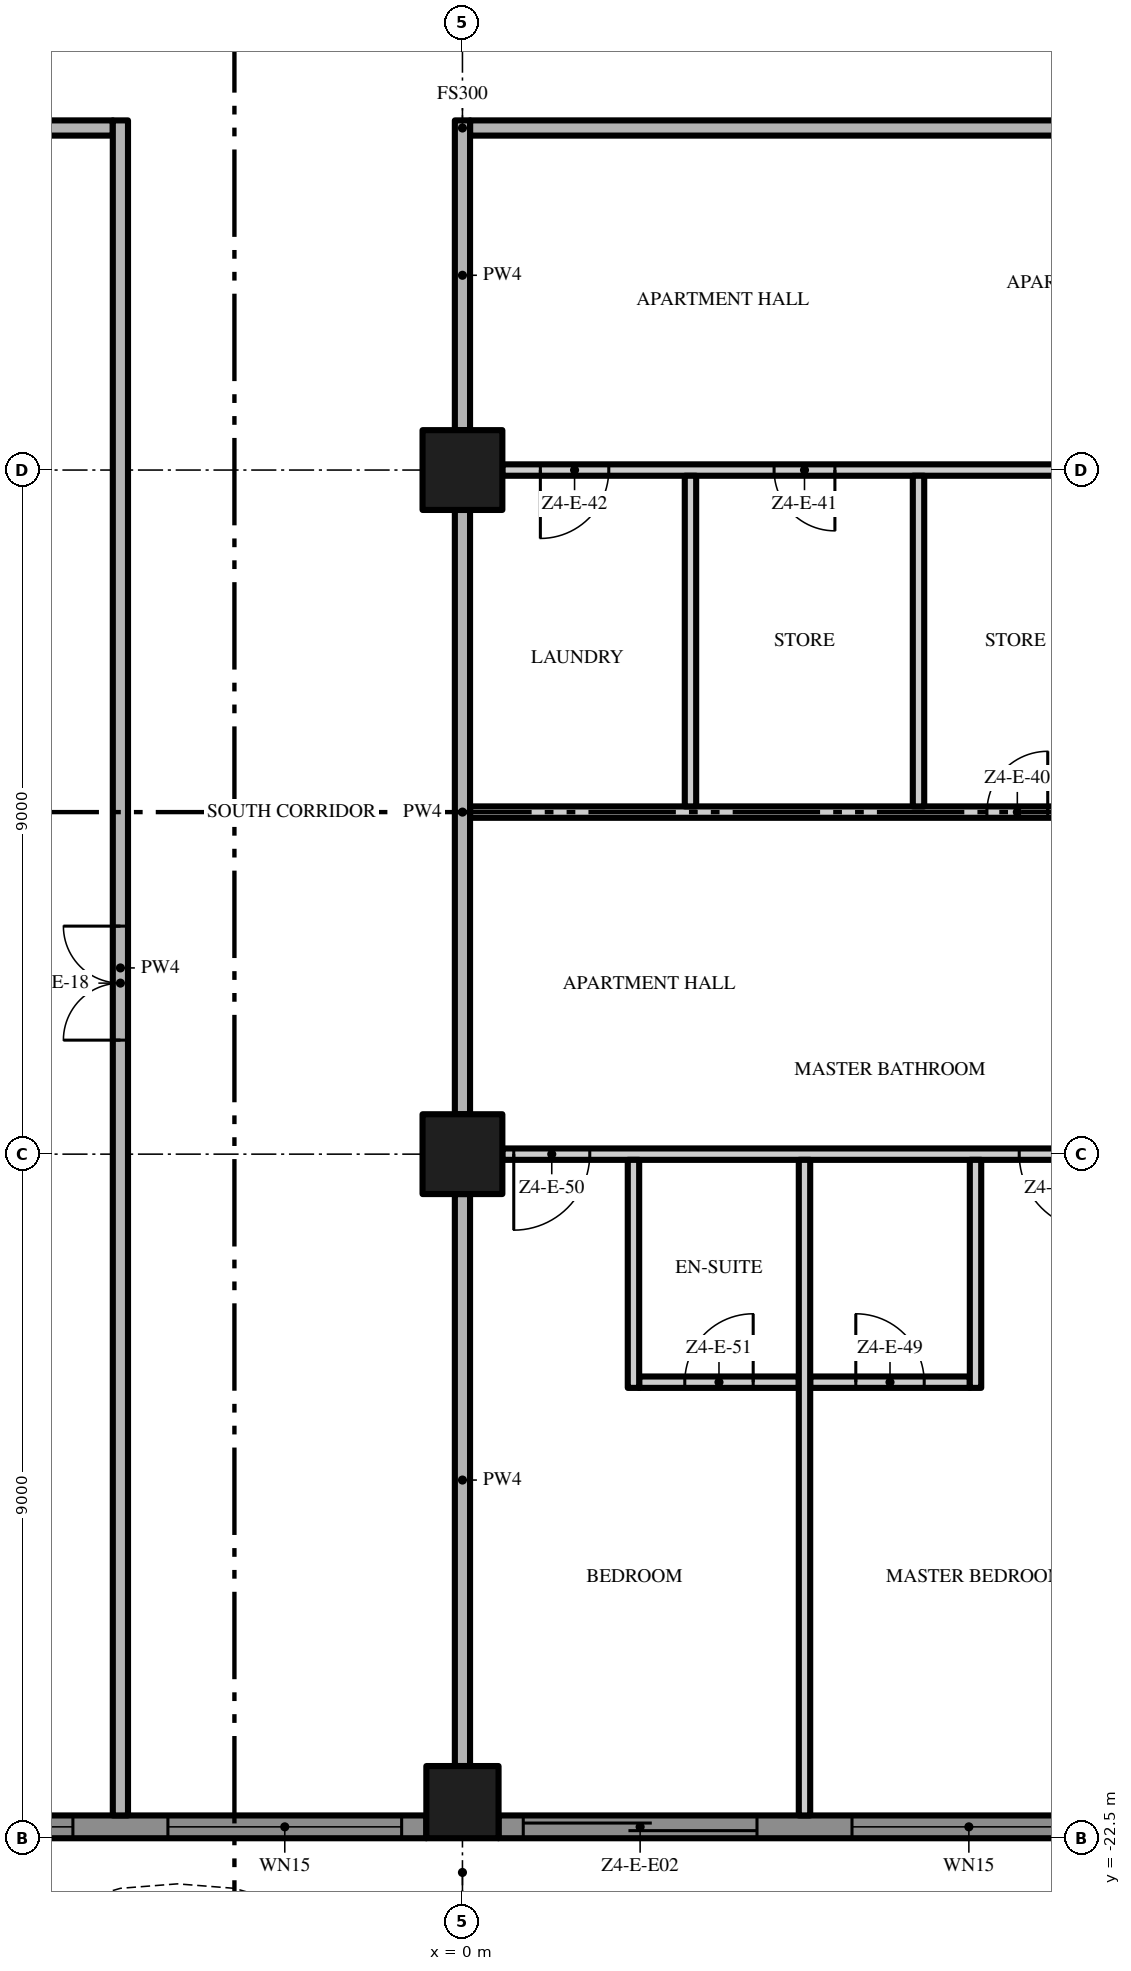
"""IFC4 building model, lengths in metres.
Left out: names, types, materials, properties, quantities, classifications, styles, units other than length and angle.
Written with IfcOpenShell. Run it as: python <this file> out.ifc"""

import sys

from ifc_helpers import new_model, si_unit, direction, frame, frame_2d, origin, origin_2d, place, context, subcontext, project, spatial, polyline, rectangle, outline, extrude, element, fill, save


model = new_model("IFC4")
c1 = context("Model", 3, precision=1e-05, world=origin(), true_north=direction((0.0, 1.0)))
c2 = subcontext(c1, "Body", "Model", "MODEL_VIEW")
j1 = project(units=[si_unit("LENGTHUNIT", "METRE"), si_unit("PLANEANGLEUNIT", "RADIAN")], contexts=[c1])
p1 = place(None, origin())
s1 = spatial("IfcSite", under=j1, at=p1, CompositionType="ELEMENT")
p2 = place(p1, origin())
s2 = spatial("IfcBuilding", under=s1, at=p2, CompositionType="ELEMENT")
p3 = place(p2, frame((0.0, 0.0, 226.2)))
s3 = spatial("IfcBuildingStorey", under=s2, at=p3, CompositionType="ELEMENT", Elevation=226.2)
p4 = place(p3, frame((0.0, -13.5, 0.0), z_axis=(0.0, 0.0, 1.0), x_axis=(1.0, 0.0, 0.0)))
e1 = element("IfcColumn", 1, at=p4, inside=s3, PredefinedType="COLUMN", context=c2, shape_type="SweptSolid", body=[
    extrude(rectangle(XDim=1.05, YDim=1.05, at=origin_2d()), origin(), (0.0, 0.0, 1.0), 3.5),
])
p5 = place(p3, frame((0.0, -22.025, 0.0), z_axis=(0.0, 0.0, 1.0), x_axis=(1.0, 0.0, 0.0)))
e2 = element("IfcColumn", 2, at=p5, inside=s3, PredefinedType="COLUMN", context=c2, shape_type="SweptSolid", body=[
    extrude(rectangle(XDim=0.95, YDim=0.95, at=origin_2d()), origin(), (0.0, 0.0, 1.0), 3.5),
])
p6 = place(p3, frame((0.0, -4.5, 0.0), z_axis=(0.0, 0.0, 1.0), x_axis=(1.0, 0.0, 0.0)))
e3 = element("IfcColumn", 3, at=p6, inside=s3, PredefinedType="COLUMN", context=c2, shape_type="SweptSolid", body=[
    extrude(rectangle(XDim=1.05, YDim=1.05, at=origin_2d()), origin(), (0.0, 0.0, 1.0), 3.5),
])
p7 = place(p3, frame((-0.475, -22.35, 0.0), z_axis=(0.0, 0.0, 1.0), x_axis=(-1.0, 0.0, 0.0)))
e4 = element("IfcWall", 4, at=p7, inside=s3, PredefinedType="SOLIDWALL", context=c2, shape_type="SweptSolid", body=[
    extrude(rectangle(XDim=8.05, YDim=0.3, at=frame_2d((4.025, 0.0))), origin(), (0.0, 0.0, 1.0), 3.5),
])
p8 = place(p7, frame((4.65, 0.0, 0.45)))
e5 = element("IfcOpeningElement", 5, at=p8, cuts=e4, PredefinedType="OPENING", context=c2, shape_type="SweptSolid", body=[
    extrude(rectangle(XDim=3.075, YDim=2.65, at=frame_2d((1.538, 1.325))), frame((0.0, 0.16, 0.0), z_axis=(0.0, -1.0, 0.0), x_axis=(1.0, 0.0, 0.0)), (0.0, 0.0, 1.0), 0.32),
])
p9 = place(p7, frame((0.325, 0.0, 0.45)))
e6 = element("IfcOpeningElement", 6, at=p9, cuts=e4, PredefinedType="OPENING", context=c2, shape_type="SweptSolid", body=[
    extrude(rectangle(XDim=3.075, YDim=2.65, at=frame_2d((1.538, 1.325))), frame((0.0, 0.16, 0.0), z_axis=(0.0, -1.0, 0.0), x_axis=(1.0, 0.0, 0.0)), (0.0, 0.0, 1.0), 0.32),
])
p10 = place(p3, frame((8.525, -22.35, 0.0), z_axis=(0.0, 0.0, 1.0), x_axis=(-1.0, 0.0, 0.0)))
e7 = element("IfcWall", 7, at=p10, inside=s3, PredefinedType="SOLIDWALL", context=c2, shape_type="SweptSolid", body=[
    extrude(rectangle(XDim=8.05, YDim=0.3, at=frame_2d((4.025, 0.0))), origin(), (0.0, 0.0, 1.0), 3.5),
])
p11 = place(p10, frame((4.65, 0.0, 0.0)))
e8 = element("IfcOpeningElement", 8, at=p11, cuts=e7, PredefinedType="OPENING", context=c2, shape_type="SweptSolid", body=[
    extrude(rectangle(XDim=3.075, YDim=2.4, at=frame_2d((1.538, 1.2))), frame((0.0, 0.16, 0.0), z_axis=(0.0, -1.0, 0.0), x_axis=(1.0, 0.0, 0.0)), (0.0, 0.0, 1.0), 0.32),
])
p12 = place(p10, frame((0.325, 0.0, 0.45)))
e9 = element("IfcOpeningElement", 9, at=p12, cuts=e7, PredefinedType="OPENING", context=c2, shape_type="SweptSolid", body=[
    extrude(rectangle(XDim=3.075, YDim=2.65, at=frame_2d((1.538, 1.325))), frame((0.0, 0.16, 0.0), z_axis=(0.0, -1.0, 0.0), x_axis=(1.0, 0.0, 0.0)), (0.0, 0.0, 1.0), 0.32),
])
p13 = place(p3, origin())
e10 = element("IfcWall", 10, at=p13, inside=s3, PredefinedType="USERDEFINED", context=c2, shape_type="SweptSolid", body=[
    extrude(outline(polyline([(-22.5, -24.3), (-21.0, -23.595), (-19.5, -23.159), (-18.75, -23.1), (-18.0, -23.159), (-16.5, -23.595), (-15.0, -24.3), (-13.5, -25.005), (-12.0, -25.441), (-11.25, -25.5), (-10.5, -25.441), (-9.0, -25.005), (-7.5, -24.3), (-6.0, -23.595), (-4.5, -23.159), (-3.75, -23.1), (-3.0, -23.159), (-1.5, -23.595), (0.0, -24.3), (1.5, -25.005), (3.0, -25.441), (3.75, -25.5), (4.5, -25.441), (6.0, -25.005), (7.5, -24.3), (9.0, -23.595), (10.5, -23.159), (11.25, -23.1), (12.0, -23.159), (13.5, -23.595), (15.0, -24.3), (16.5, -25.005), (18.0, -25.441), (18.75, -25.5), (19.5, -25.441), (21.0, -25.005), (22.5, -24.3), (22.394, -24.074), (20.911, -24.771), (19.455, -25.194), (18.75, -25.249), (18.045, -25.194), (16.589, -24.771), (15.106, -24.074), (13.589, -23.36), (12.045, -22.911), (11.25, -22.849), (10.455, -22.911), (8.911, -23.36), (7.394, -24.074), (5.911, -24.771), (4.455, -25.194), (3.75, -25.249), (3.045, -25.194), (1.589, -24.771), (0.106, -24.074), (-1.411, -23.36), (-2.955, -22.911), (-3.75, -22.849), (-4.545, -22.911), (-6.089, -23.36), (-7.606, -24.074), (-9.089, -24.771), (-10.545, -25.194), (-11.25, -25.249), (-11.955, -25.194), (-13.411, -24.771), (-14.894, -24.074), (-16.411, -23.36), (-17.955, -22.911), (-18.75, -22.849), (-19.545, -22.911), (-21.089, -23.36), (-22.606, -24.074), (-22.5, -24.3)])), origin(), (0.0, 0.0, 1.0), 0.9),
])
p14 = place(p3, frame((2.325, -16.5, 0.0), z_axis=(0.0, 0.0, 1.0), x_axis=(1.0, 0.0, 0.0)))
e11 = element("IfcWall", 11, at=p14, inside=s3, PredefinedType="PARTITIONING", context=c2, shape_type="SweptSolid", body=[
    extrude(rectangle(XDim=2.1, YDim=0.15, at=frame_2d((1.05, 0.0))), origin(), (0.0, 0.0, 1.0), 3.5),
])
p15 = place(p14, frame((0.6, 0.0, 0.0)))
e12 = element("IfcOpeningElement", 12, at=p15, cuts=e11, PredefinedType="OPENING", context=c2, shape_type="SweptSolid", body=[
    extrude(rectangle(XDim=0.9, YDim=2.1, at=frame_2d((0.45, 1.05))), frame((0.0, 0.085, 0.0), z_axis=(0.0, -1.0, 0.0), x_axis=(1.0, 0.0, 0.0)), (0.0, 0.0, 1.0), 0.17),
])
p16 = place(p3, frame((4.575, -16.5, 0.0), z_axis=(0.0, 0.0, 1.0), x_axis=(1.0, 0.0, 0.0)))
e13 = element("IfcWall", 13, at=p16, inside=s3, PredefinedType="PARTITIONING", context=c2, shape_type="SweptSolid", body=[
    extrude(rectangle(XDim=2.1, YDim=0.15, at=frame_2d((1.05, 0.0))), origin(), (0.0, 0.0, 1.0), 3.5),
])
p17 = place(p16, frame((0.6, 0.0, 0.0)))
e14 = element("IfcOpeningElement", 14, at=p17, cuts=e13, PredefinedType="OPENING", context=c2, shape_type="SweptSolid", body=[
    extrude(rectangle(XDim=0.9, YDim=2.1, at=frame_2d((0.45, 1.05))), frame((0.0, 0.085, 0.0), z_axis=(0.0, -1.0, 0.0), x_axis=(1.0, 0.0, 0.0)), (0.0, 0.0, 1.0), 0.17),
])
p18 = place(p3, frame((8.475, -13.5, 0.0), z_axis=(0.0, 0.0, 1.0), x_axis=(-1.0, 0.0, 0.0)))
e15 = element("IfcWall", 15, at=p18, inside=s3, PredefinedType="PARTITIONING", context=c2, shape_type="SweptSolid", body=[
    extrude(rectangle(XDim=7.95, YDim=0.15, at=frame_2d((3.975, 0.0))), origin(), (0.0, 0.0, 1.0), 3.5),
])
p19 = place(p18, frame((0.15, 0.0, 0.0)))
e16 = element("IfcOpeningElement", 16, at=p19, cuts=e15, PredefinedType="OPENING", context=c2, shape_type="SweptSolid", body=[
    extrude(rectangle(XDim=1.0, YDim=2.4, at=frame_2d((0.5, 1.2))), frame((0.0, 0.085, 0.0), z_axis=(0.0, -1.0, 0.0), x_axis=(1.0, 0.0, 0.0)), (0.0, 0.0, 1.0), 0.17),
])
p20 = place(p18, frame((6.8, 0.0, 0.0)))
e17 = element("IfcOpeningElement", 17, at=p20, cuts=e15, PredefinedType="OPENING", context=c2, shape_type="SweptSolid", body=[
    extrude(rectangle(XDim=1.0, YDim=2.4, at=frame_2d((0.5, 1.2))), frame((0.0, 0.085, 0.0), z_axis=(0.0, -1.0, 0.0), x_axis=(1.0, 0.0, 0.0)), (0.0, 0.0, 1.0), 0.17),
])
p21 = place(p3, frame((0.1, -9.0, 0.0), z_axis=(0.0, 0.0, 1.0), x_axis=(1.0, 0.0, 0.0)))
e18 = element("IfcWall", 18, at=p21, inside=s3, PredefinedType="PARTITIONING", context=c2, shape_type="SweptSolid", body=[
    extrude(rectangle(XDim=11.075, YDim=0.15, at=frame_2d((5.537, 0.0))), origin(), (0.0, 0.0, 1.0), 3.5),
])
p22 = place(p21, frame((6.8, 0.0, 0.0)))
e19 = element("IfcOpeningElement", 19, at=p22, cuts=e18, PredefinedType="OPENING", context=c2, shape_type="SweptSolid", body=[
    extrude(rectangle(XDim=0.8, YDim=2.0, at=frame_2d((0.4, 1.0))), frame((0.0, 0.085, 0.0), z_axis=(0.0, -1.0, 0.0), x_axis=(1.0, 0.0, 0.0)), (0.0, 0.0, 1.0), 0.17),
])
p23 = place(p3, frame((8.475, -4.5, 0.0), z_axis=(0.0, 0.0, 1.0), x_axis=(-1.0, 0.0, 0.0)))
e20 = element("IfcWall", 20, at=p23, inside=s3, PredefinedType="PARTITIONING", context=c2, shape_type="SweptSolid", body=[
    extrude(rectangle(XDim=7.95, YDim=0.15, at=frame_2d((3.975, 0.0))), origin(), (0.0, 0.0, 1.0), 3.5),
])
p24 = place(p23, frame((3.575, 0.0, 0.0)))
e21 = element("IfcOpeningElement", 21, at=p24, cuts=e20, PredefinedType="OPENING", context=c2, shape_type="SweptSolid", body=[
    extrude(rectangle(XDim=0.8, YDim=2.0, at=frame_2d((0.4, 1.0))), frame((0.0, 0.085, 0.0), z_axis=(0.0, -1.0, 0.0), x_axis=(1.0, 0.0, 0.0)), (0.0, 0.0, 1.0), 0.17),
])
p25 = place(p23, frame((6.55, 0.0, 0.0)))
e22 = element("IfcOpeningElement", 22, at=p25, cuts=e20, PredefinedType="OPENING", context=c2, shape_type="SweptSolid", body=[
    extrude(rectangle(XDim=0.9, YDim=2.1, at=frame_2d((0.45, 1.05))), frame((0.0, 0.085, 0.0), z_axis=(0.0, -1.0, 0.0), x_axis=(1.0, 0.0, 0.0)), (0.0, 0.0, 1.0), 0.17),
])
p26 = place(p3, frame((-17.4, 0.0, 0.0), z_axis=(0.0, 0.0, 1.0), x_axis=(1.0, 0.0, 0.0)))
e23 = element("IfcWall", 23, at=p26, inside=s3, PredefinedType="PARTITIONING", context=c2, shape_type="SweptSolid", body=[
    extrude(rectangle(XDim=12.8, YDim=0.2, at=frame_2d((6.4, 0.0))), origin(), (0.0, 0.0, 1.0), 3.5),
])
p27 = place(p3, frame((17.4, 0.0, 0.0), z_axis=(0.0, 0.0, 1.0), x_axis=(-1.0, 0.0, 0.0)))
e24 = element("IfcWall", 24, at=p27, inside=s3, PredefinedType="PARTITIONING", context=c2, shape_type="SweptSolid", body=[
    extrude(rectangle(XDim=17.3, YDim=0.2, at=frame_2d((8.65, 0.0))), origin(), (0.0, 0.0, 1.0), 3.5),
])
p28 = place(p27, frame((7.65, 0.0, 0.0)))
e25 = element("IfcOpeningElement", 25, at=p28, cuts=e24, PredefinedType="OPENING", context=c2, shape_type="SweptSolid", body=[
    extrude(rectangle(XDim=1.5, YDim=2.4, at=frame_2d((0.75, 1.2))), frame((0.0, 0.11, 0.0), z_axis=(0.0, -1.0, 0.0), x_axis=(1.0, 0.0, 0.0)), (0.0, 0.0, 1.0), 0.22),
])
p29 = place(p3, frame((-4.5, -22.2, 0.0), z_axis=(0.0, 0.0, 1.0), x_axis=(0.0, 1.0, 0.0)))
e26 = element("IfcWall", 26, at=p29, inside=s3, PredefinedType="PARTITIONING", context=c2, shape_type="SweptSolid", body=[
    extrude(rectangle(XDim=22.3, YDim=0.2, at=frame_2d((11.15, 0.0))), origin(), (0.0, 0.0, 1.0), 3.5),
])
p30 = place(p29, frame((10.2, 0.0, 0.0)))
e27 = element("IfcOpeningElement", 27, at=p30, cuts=e26, PredefinedType="OPENING", context=c2, shape_type="SweptSolid", body=[
    extrude(rectangle(XDim=1.5, YDim=2.4, at=frame_2d((0.75, 1.2))), frame((0.0, 0.11, 0.0), z_axis=(0.0, -1.0, 0.0), x_axis=(1.0, 0.0, 0.0)), (0.0, 0.0, 1.0), 0.22),
])
p31 = place(p3, frame((0.0, -21.55, 0.0), z_axis=(0.0, 0.0, 1.0), x_axis=(0.0, 1.0, 0.0)))
e28 = element("IfcWall", 28, at=p31, inside=s3, PredefinedType="PARTITIONING", context=c2, shape_type="SweptSolid", body=[
    extrude(rectangle(XDim=7.525, YDim=0.2, at=frame_2d((3.763, 0.0))), origin(), (0.0, 0.0, 1.0), 3.5),
])
p32 = place(p3, frame((0.0, -12.975, 0.0), z_axis=(0.0, 0.0, 1.0), x_axis=(0.0, 1.0, 0.0)))
e29 = element("IfcWall", 29, at=p32, inside=s3, PredefinedType="PARTITIONING", context=c2, shape_type="SweptSolid", body=[
    extrude(rectangle(XDim=7.95, YDim=0.2, at=frame_2d((3.975, 0.0))), origin(), (0.0, 0.0, 1.0), 3.5),
])
p33 = place(p3, frame((0.0, -3.975, 0.0), z_axis=(0.0, 0.0, 1.0), x_axis=(0.0, 1.0, 0.0)))
e30 = element("IfcWall", 30, at=p33, inside=s3, PredefinedType="PARTITIONING", context=c2, shape_type="SweptSolid", body=[
    extrude(rectangle(XDim=4.075, YDim=0.2, at=frame_2d((2.038, 0.0))), origin(), (0.0, 0.0, 1.0), 3.5),
])
p34 = place(p3, frame((2.25, -16.575, 0.0), z_axis=(0.0, 0.0, 1.0), x_axis=(0.0, 1.0, 0.0)))
e31 = element("IfcWall", 31, at=p34, inside=s3, PredefinedType="PARTITIONING", context=c2, shape_type="SweptSolid", body=[
    extrude(rectangle(XDim=3.0, YDim=0.15, at=frame_2d((1.5, 0.0))), origin(), (0.0, 0.0, 1.0), 3.5),
])
p35 = place(p3, frame((3.0, -8.925, 0.0), z_axis=(0.0, 0.0, 1.0), x_axis=(0.0, 1.0, 0.0)))
e32 = element("IfcWall", 32, at=p35, inside=s3, PredefinedType="PARTITIONING", context=c2, shape_type="SweptSolid", body=[
    extrude(rectangle(XDim=4.35, YDim=0.15, at=frame_2d((2.175, 0.0))), origin(), (0.0, 0.0, 1.0), 3.5),
])
p36 = place(p3, frame((4.5, -22.2, 0.0), z_axis=(0.0, 0.0, 1.0), x_axis=(0.0, 1.0, 0.0)))
e33 = element("IfcWall", 33, at=p36, inside=s3, PredefinedType="PARTITIONING", context=c2, shape_type="SweptSolid", body=[
    extrude(rectangle(XDim=8.625, YDim=0.15, at=frame_2d((4.312, 0.0))), origin(), (0.0, 0.0, 1.0), 3.5),
])
p37 = place(p3, frame((6.0, -8.925, 0.0), z_axis=(0.0, 0.0, 1.0), x_axis=(0.0, 1.0, 0.0)))
e34 = element("IfcWall", 34, at=p37, inside=s3, PredefinedType="PARTITIONING", context=c2, shape_type="SweptSolid", body=[
    extrude(rectangle(XDim=4.35, YDim=0.15, at=frame_2d((2.175, 0.0))), origin(), (0.0, 0.0, 1.0), 3.5),
])
p38 = place(p3, frame((6.75, -16.575, 0.0), z_axis=(0.0, 0.0, 1.0), x_axis=(0.0, 1.0, 0.0)))
e35 = element("IfcWall", 35, at=p38, inside=s3, PredefinedType="PARTITIONING", context=c2, shape_type="SweptSolid", body=[
    extrude(rectangle(XDim=3.0, YDim=0.15, at=frame_2d((1.5, 0.0))), origin(), (0.0, 0.0, 1.0), 3.5),
])
p39 = place(p8, origin())
e36 = element("IfcWindow", 36, at=p39, inside=s3, PartitioningType="SINGLE_PANEL", PredefinedType="WINDOW", context=c2, shape_type="SweptSolid", body=[
    extrude(rectangle(XDim=3.075, YDim=2.65, at=frame_2d((1.538, 1.325))), frame((0.0, 0.03, 0.0), z_axis=(0.0, -1.0, 0.0), x_axis=(1.0, 0.0, 0.0)), (0.0, 0.0, 1.0), 0.06),
])
fill(e5, e36)
p40 = place(p9, origin())
e37 = element("IfcWindow", 37, at=p40, inside=s3, PartitioningType="SINGLE_PANEL", PredefinedType="WINDOW", context=c2, shape_type="SweptSolid", body=[
    extrude(rectangle(XDim=3.075, YDim=2.65, at=frame_2d((1.538, 1.325))), frame((0.0, 0.03, 0.0), z_axis=(0.0, -1.0, 0.0), x_axis=(1.0, 0.0, 0.0)), (0.0, 0.0, 1.0), 0.06),
])
fill(e6, e37)
p41 = place(p11, origin())
e38 = element("IfcDoor", 38, at=p41, inside=s3, OperationType="SINGLE_SWING_LEFT", PredefinedType="DOOR", context=c2, shape_type="SweptSolid", body=[
    extrude(rectangle(XDim=3.075, YDim=2.4, at=frame_2d((1.538, 1.2))), frame((0.0, 0.025, 0.0), z_axis=(0.0, -1.0, 0.0), x_axis=(1.0, 0.0, 0.0)), (0.0, 0.0, 1.0), 0.05),
])
fill(e8, e38)
p42 = place(p12, origin())
e39 = element("IfcWindow", 39, at=p42, inside=s3, PartitioningType="SINGLE_PANEL", PredefinedType="WINDOW", context=c2, shape_type="SweptSolid", body=[
    extrude(rectangle(XDim=3.075, YDim=2.65, at=frame_2d((1.538, 1.325))), frame((0.0, 0.03, 0.0), z_axis=(0.0, -1.0, 0.0), x_axis=(1.0, 0.0, 0.0)), (0.0, 0.0, 1.0), 0.06),
])
fill(e9, e39)
p43 = place(p30, origin())
e40 = element("IfcDoor", 40, at=p43, inside=s3, OperationType="DOUBLE_DOOR_SINGLE_SWING", PredefinedType="DOOR", context=c2, shape_type="SweptSolid", body=[
    extrude(rectangle(XDim=1.5, YDim=2.4, at=frame_2d((0.75, 1.2))), frame((0.0, 0.025, 0.0), z_axis=(0.0, -1.0, 0.0), x_axis=(1.0, 0.0, 0.0)), (0.0, 0.0, 1.0), 0.05),
])
fill(e27, e40)
p44 = place(p22, origin())
e41 = element("IfcDoor", 41, at=p44, inside=s3, OperationType="SINGLE_SWING_RIGHT", PredefinedType="DOOR", context=c2, shape_type="SweptSolid", body=[
    extrude(rectangle(XDim=0.8, YDim=2.0, at=frame_2d((0.4, 1.0))), frame((0.0, 0.025, 0.0), z_axis=(0.0, -1.0, 0.0), x_axis=(1.0, 0.0, 0.0)), (0.0, 0.0, 1.0), 0.05),
])
fill(e19, e41)
p45 = place(p24, origin())
e42 = element("IfcDoor", 42, at=p45, inside=s3, OperationType="SINGLE_SWING_LEFT", PredefinedType="DOOR", context=c2, shape_type="SweptSolid", body=[
    extrude(rectangle(XDim=0.8, YDim=2.0, at=frame_2d((0.4, 1.0))), frame((0.0, 0.025, 0.0), z_axis=(0.0, -1.0, 0.0), x_axis=(1.0, 0.0, 0.0)), (0.0, 0.0, 1.0), 0.05),
])
fill(e21, e42)
p46 = place(p25, origin())
e43 = element("IfcDoor", 43, at=p46, inside=s3, OperationType="SINGLE_SWING_RIGHT", PredefinedType="DOOR", context=c2, shape_type="SweptSolid", body=[
    extrude(rectangle(XDim=0.9, YDim=2.1, at=frame_2d((0.45, 1.05))), frame((0.0, 0.025, 0.0), z_axis=(0.0, -1.0, 0.0), x_axis=(1.0, 0.0, 0.0)), (0.0, 0.0, 1.0), 0.05),
])
fill(e22, e43)
p47 = place(p19, origin())
e44 = element("IfcDoor", 44, at=p47, inside=s3, OperationType="SINGLE_SWING_LEFT", PredefinedType="DOOR", context=c2, shape_type="SweptSolid", body=[
    extrude(rectangle(XDim=1.0, YDim=2.4, at=frame_2d((0.5, 1.2))), frame((0.0, 0.025, 0.0), z_axis=(0.0, -1.0, 0.0), x_axis=(1.0, 0.0, 0.0)), (0.0, 0.0, 1.0), 0.05),
])
fill(e16, e44)
p48 = place(p17, origin())
e45 = element("IfcDoor", 45, at=p48, inside=s3, OperationType="SINGLE_SWING_LEFT", PredefinedType="DOOR", context=c2, shape_type="SweptSolid", body=[
    extrude(rectangle(XDim=0.9, YDim=2.1, at=frame_2d((0.45, 1.05))), frame((0.0, 0.025, 0.0), z_axis=(0.0, -1.0, 0.0), x_axis=(1.0, 0.0, 0.0)), (0.0, 0.0, 1.0), 0.05),
])
fill(e14, e45)
p49 = place(p20, origin())
e46 = element("IfcDoor", 46, at=p49, inside=s3, OperationType="SINGLE_SWING_RIGHT", PredefinedType="DOOR", context=c2, shape_type="SweptSolid", body=[
    extrude(rectangle(XDim=1.0, YDim=2.4, at=frame_2d((0.5, 1.2))), frame((0.0, 0.025, 0.0), z_axis=(0.0, -1.0, 0.0), x_axis=(1.0, 0.0, 0.0)), (0.0, 0.0, 1.0), 0.05),
])
fill(e17, e46)
p50 = place(p15, origin())
e47 = element("IfcDoor", 47, at=p50, inside=s3, OperationType="SINGLE_SWING_RIGHT", PredefinedType="DOOR", context=c2, shape_type="SweptSolid", body=[
    extrude(rectangle(XDim=0.9, YDim=2.1, at=frame_2d((0.45, 1.05))), frame((0.0, 0.025, 0.0), z_axis=(0.0, -1.0, 0.0), x_axis=(1.0, 0.0, 0.0)), (0.0, 0.0, 1.0), 0.05),
])
fill(e12, e47)
save(model, sys.argv[1])
